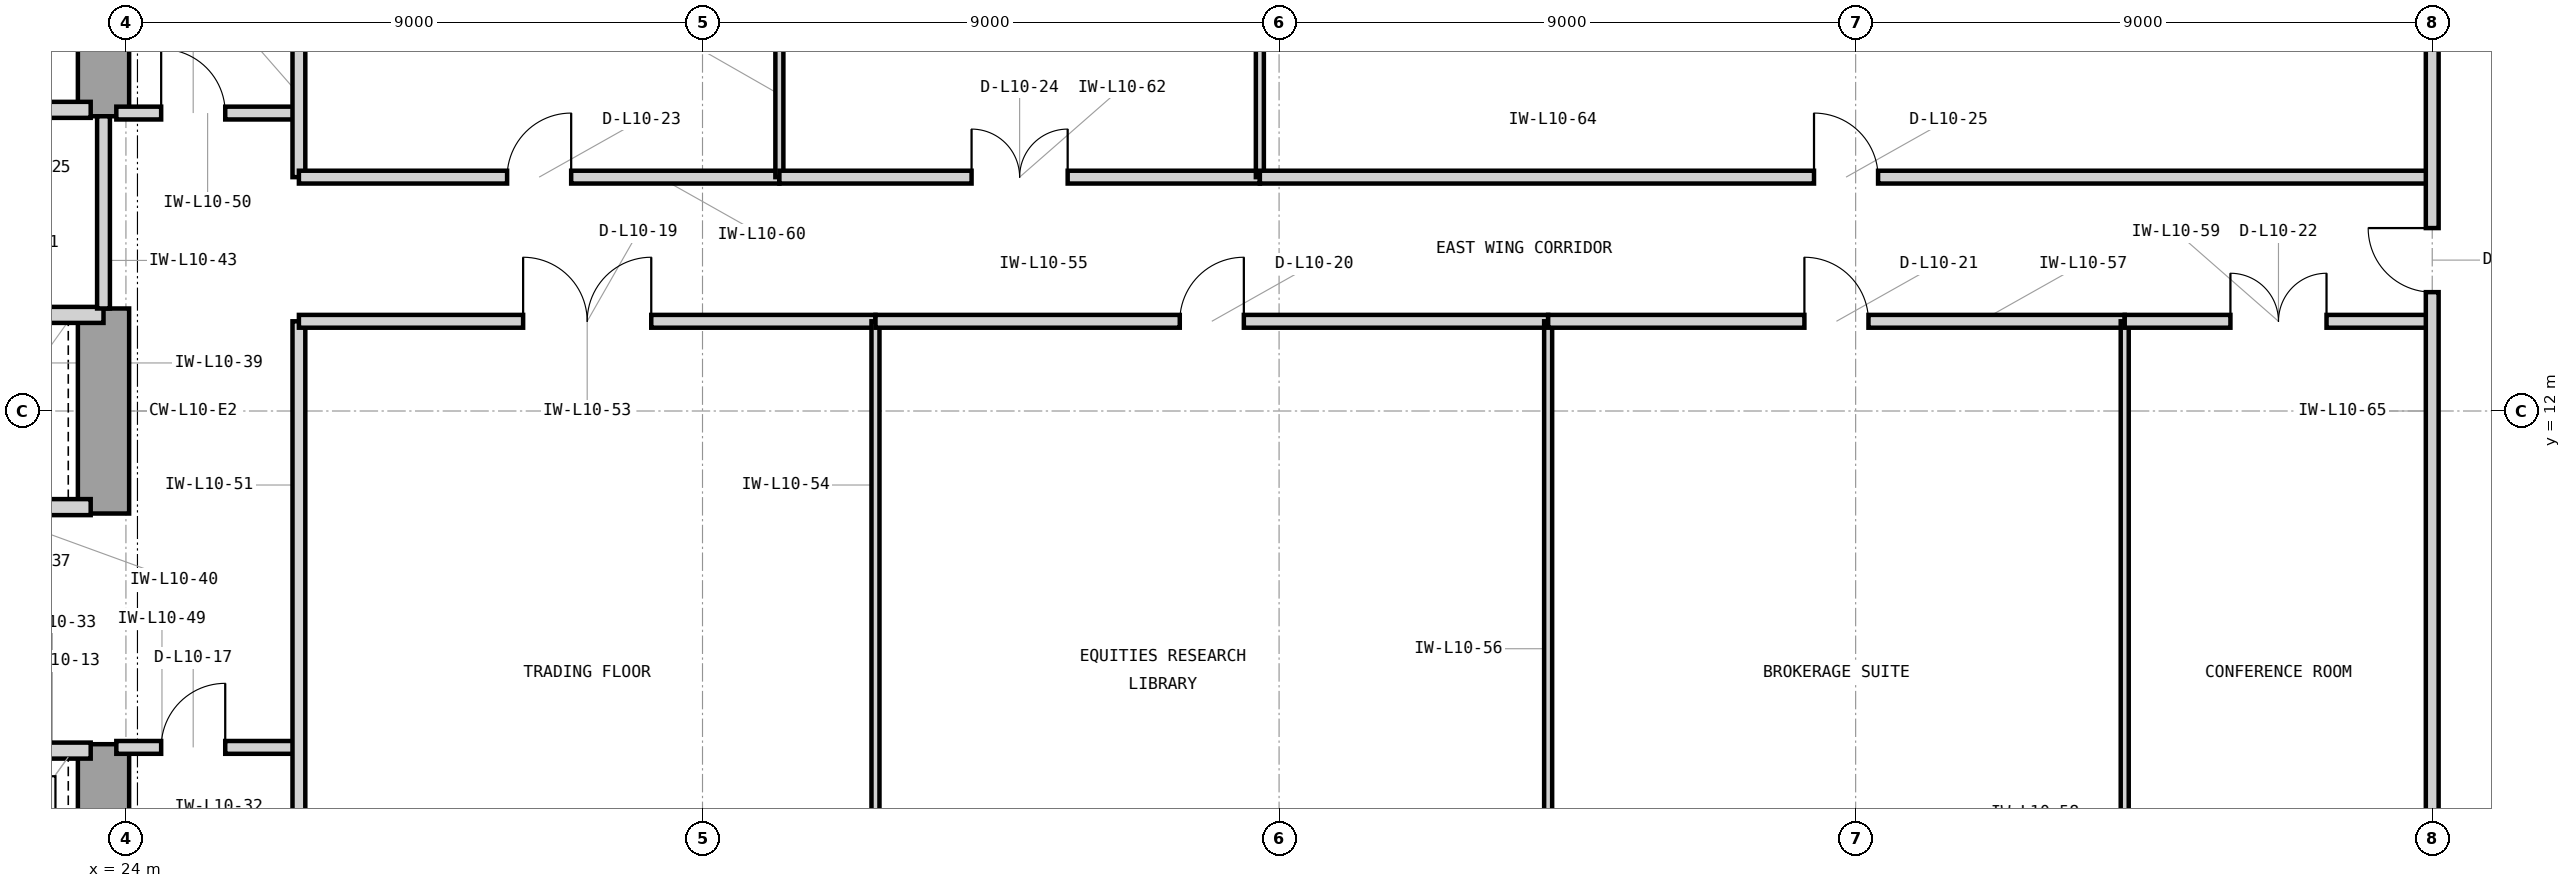
"""IFC4 building model, lengths in metres.
Left out: names, types, materials, properties, quantities, classifications, styles, units other than length and angle.
Written with IfcOpenShell. Run it as: python <this file> out.ifc"""

import sys

from ifc_helpers import new_model, si_unit, direction, frame, frame_2d, origin, place, context, subcontext, project, spatial, rectangle, extrude, element, fill, save


model = new_model("IFC4")
c1 = context("Model", 3, precision=1e-05, world=origin(), true_north=direction((0.0, 1.0)))
c2 = subcontext(c1, "Body", "Model", "MODEL_VIEW")
j1 = project(units=[si_unit("LENGTHUNIT", "METRE"), si_unit("PLANEANGLEUNIT", "RADIAN")], contexts=[c1])
p1 = place(None, origin())
s1 = spatial("IfcSite", under=j1, at=p1, CompositionType="ELEMENT")
p2 = place(p1, origin())
s2 = spatial("IfcBuilding", under=s1, at=p2, CompositionType="ELEMENT")
p3 = place(p2, frame((0.0, 0.0, 46.8)))
s3 = spatial("IfcBuildingStorey", under=s2, at=p3, CompositionType="ELEMENT", Elevation=46.8)
p4 = place(p3, frame((23.65, 3.75, 0.0), z_axis=(0.0, 0.0, 1.0), x_axis=(0.0, 1.0, 0.0)))
e1 = element("IfcWall", 1, at=p4, inside=s3, PredefinedType="SHEAR", context=c2, shape_type="SweptSolid", body=[
    extrude(rectangle(XDim=3.05, YDim=0.8, at=frame_2d((1.525, 0.0))), origin(), (0.0, 0.0, 1.0), 4.2),
])
p5 = place(p3, frame((23.65, 10.4, 0.0), z_axis=(0.0, 0.0, 1.0), x_axis=(0.0, 1.0, 0.0)))
e2 = element("IfcWall", 2, at=p5, inside=s3, PredefinedType="SHEAR", context=c2, shape_type="SweptSolid", body=[
    extrude(rectangle(XDim=3.2, YDim=0.8, at=frame_2d((1.6, 0.0))), origin(), (0.0, 0.0, 1.0), 4.2),
])
p6 = place(p3, frame((23.65, 16.6, 0.0), z_axis=(0.0, 0.0, 1.0), x_axis=(0.0, 1.0, 0.0)))
e3 = element("IfcWall", 3, at=p6, inside=s3, PredefinedType="SHEAR", context=c2, shape_type="SweptSolid", body=[
    extrude(rectangle(XDim=4.05, YDim=0.8, at=frame_2d((2.025, 0.0))), origin(), (0.0, 0.0, 1.0), 4.2),
])
p7 = place(p3, frame((21.05, 16.7, 0.0), z_axis=(0.0, 0.0, 1.0), x_axis=(1.0, 0.0, 0.0)))
e4 = element("IfcWall", 4, at=p7, inside=s3, PredefinedType="PARTITIONING", context=c2, shape_type="SweptSolid", body=[
    extrude(rectangle(XDim=2.4, YDim=0.25, at=frame_2d((1.2, 0.0))), origin(), (0.0, 0.0, 1.0), 3.426),
])
p8 = place(p3, frame((21.05, 6.7, 0.0), z_axis=(0.0, 0.0, 1.0), x_axis=(1.0, 0.0, 0.0)))
e5 = element("IfcWall", 5, at=p8, inside=s3, PredefinedType="PARTITIONING", context=c2, shape_type="SweptSolid", body=[
    extrude(rectangle(XDim=2.4, YDim=0.25, at=frame_2d((1.2, 0.0))), origin(), (0.0, 0.0, 1.0), 3.426),
])
p9 = place(p8, frame((0.48, 0.0, 0.0)))
e6 = element("IfcOpeningElement", 6, at=p9, cuts=e5, PredefinedType="OPENING", context=c2, shape_type="SweptSolid", body=[
    extrude(rectangle(XDim=1.15, YDim=2.25, at=frame_2d((0.575, 1.125))), frame((0.0, 0.135, 0.0), z_axis=(0.0, -1.0, 0.0), x_axis=(1.0, 0.0, 0.0)), (0.0, 0.0, 1.0), 0.27),
])
p10 = place(p3, frame((21.05, 10.5, 0.0), z_axis=(0.0, 0.0, 1.0), x_axis=(1.0, 0.0, 0.0)))
e7 = element("IfcWall", 7, at=p10, inside=s3, PredefinedType="PARTITIONING", context=c2, shape_type="SweptSolid", body=[
    extrude(rectangle(XDim=2.4, YDim=0.25, at=frame_2d((1.2, 0.0))), origin(), (0.0, 0.0, 1.0), 3.426),
])
p11 = place(p3, frame((14.7, 13.5, 0.0), z_axis=(0.0, 0.0, 1.0), x_axis=(1.0, 0.0, 0.0)))
e8 = element("IfcWall", 8, at=p11, inside=s3, PredefinedType="PARTITIONING", context=c2, shape_type="SweptSolid", body=[
    extrude(rectangle(XDim=8.95, YDim=0.25, at=frame_2d((4.475, 0.0))), origin(), (0.0, 0.0, 1.0), 3.426),
])
p12 = place(p3, frame((23.65, 13.6, 0.0), z_axis=(0.0, 0.0, 1.0), x_axis=(0.0, 1.0, 0.0)))
e9 = element("IfcWall", 9, at=p12, inside=s3, PredefinedType="PARTITIONING", context=c2, shape_type="SweptSolid", body=[
    extrude(rectangle(XDim=3.0, YDim=0.2, at=frame_2d((1.5, 0.0))), origin(), (0.0, 0.0, 1.0), 3.97),
])
p13 = place(p3, frame((23.85, 6.75, 0.0), z_axis=(0.0, 0.0, 1.0), x_axis=(1.0, 0.0, 0.0)))
e10 = element("IfcWall", 10, at=p13, inside=s3, PredefinedType="PARTITIONING", context=c2, shape_type="SweptSolid", body=[
    extrude(rectangle(XDim=2.85, YDim=0.2, at=frame_2d((1.425, 0.0))), origin(), (0.0, 0.0, 1.0), 3.97),
])
p14 = place(p13, frame((0.7, 0.0, 0.0)))
e11 = element("IfcOpeningElement", 11, at=p14, cuts=e10, PredefinedType="OPENING", context=c2, shape_type="SweptSolid", body=[
    extrude(rectangle(XDim=1.0, YDim=2.15, at=frame_2d((0.5, 1.075))), frame((0.0, 0.11, 0.0), z_axis=(0.0, -1.0, 0.0), x_axis=(1.0, 0.0, 0.0)), (0.0, 0.0, 1.0), 0.22),
])
p15 = place(p3, frame((23.85, 16.65, 0.0), z_axis=(0.0, 0.0, 1.0), x_axis=(1.0, 0.0, 0.0)))
e12 = element("IfcWall", 12, at=p15, inside=s3, PredefinedType="PARTITIONING", context=c2, shape_type="SweptSolid", body=[
    extrude(rectangle(XDim=2.85, YDim=0.2, at=frame_2d((1.425, 0.0))), origin(), (0.0, 0.0, 1.0), 3.97),
])
p16 = place(p15, frame((0.7, 0.0, 0.0)))
e13 = element("IfcOpeningElement", 13, at=p16, cuts=e12, PredefinedType="OPENING", context=c2, shape_type="SweptSolid", body=[
    extrude(rectangle(XDim=1.0, YDim=2.15, at=frame_2d((0.5, 1.075))), frame((0.0, 0.11, 0.0), z_axis=(0.0, -1.0, 0.0), x_axis=(1.0, 0.0, 0.0)), (0.0, 0.0, 1.0), 0.22),
])
p17 = place(p3, frame((26.7, 3.18, 0.0), z_axis=(0.0, 0.0, 1.0), x_axis=(0.0, 1.0, 0.0)))
e14 = element("IfcWall", 14, at=p17, inside=s3, PredefinedType="PARTITIONING", context=c2, shape_type="SweptSolid", body=[
    extrude(rectangle(XDim=10.22, YDim=0.2, at=frame_2d((5.11, 0.0))), origin(), (0.0, 0.0, 1.0), 3.97),
])
p18 = place(p3, frame((26.7, 15.65, 0.0), z_axis=(0.0, 0.0, 1.0), x_axis=(0.0, 1.0, 0.0)))
e15 = element("IfcWall", 15, at=p18, inside=s3, PredefinedType="PARTITIONING", context=c2, shape_type="SweptSolid", body=[
    extrude(rectangle(XDim=5.17, YDim=0.2, at=frame_2d((2.585, 0.0))), origin(), (0.0, 0.0, 1.0), 3.97),
])
p19 = place(p3, frame((26.7, 13.4, 0.0), z_axis=(0.0, 0.0, 1.0), x_axis=(1.0, 0.0, 0.0)))
e16 = element("IfcWall", 16, at=p19, inside=s3, PredefinedType="PARTITIONING", context=c2, shape_type="SweptSolid", body=[
    extrude(rectangle(XDim=9.0, YDim=0.2, at=frame_2d((4.5, 0.0))), origin(), (0.0, 0.0, 1.0), 3.97),
])
p20 = place(p19, frame((3.5, 0.0, 0.0)))
e17 = element("IfcOpeningElement", 17, at=p20, cuts=e16, PredefinedType="OPENING", context=c2, shape_type="SweptSolid", body=[
    extrude(rectangle(XDim=2.0, YDim=2.5, at=frame_2d((1.0, 1.25))), frame((0.0, 0.11, 0.0), z_axis=(0.0, -1.0, 0.0), x_axis=(1.0, 0.0, 0.0)), (0.0, 0.0, 1.0), 0.22),
])
p21 = place(p3, frame((35.7, 3.18, 0.0), z_axis=(0.0, 0.0, 1.0), x_axis=(0.0, 1.0, 0.0)))
e18 = element("IfcWall", 18, at=p21, inside=s3, PredefinedType="PARTITIONING", context=c2, shape_type="SweptSolid", body=[
    extrude(rectangle(XDim=10.22, YDim=0.125, at=frame_2d((5.11, 0.0))), origin(), (0.0, 0.0, 1.0), 3.97),
])
p22 = place(p3, frame((35.7, 13.4, 0.0), z_axis=(0.0, 0.0, 1.0), x_axis=(1.0, 0.0, 0.0)))
e19 = element("IfcWall", 19, at=p22, inside=s3, PredefinedType="PARTITIONING", context=c2, shape_type="SweptSolid", body=[
    extrude(rectangle(XDim=10.5, YDim=0.2, at=frame_2d((5.25, 0.0))), origin(), (0.0, 0.0, 1.0), 3.97),
])
p23 = place(p22, frame((4.75, 0.0, 0.0)))
e20 = element("IfcOpeningElement", 20, at=p23, cuts=e19, PredefinedType="OPENING", context=c2, shape_type="SweptSolid", body=[
    extrude(rectangle(XDim=1.0, YDim=2.15, at=frame_2d((0.5, 1.075))), frame((0.0, 0.11, 0.0), z_axis=(0.0, -1.0, 0.0), x_axis=(1.0, 0.0, 0.0)), (0.0, 0.0, 1.0), 0.22),
])
p24 = place(p3, frame((46.2, 3.18, 0.0), z_axis=(0.0, 0.0, 1.0), x_axis=(0.0, 1.0, 0.0)))
e21 = element("IfcWall", 21, at=p24, inside=s3, PredefinedType="PARTITIONING", context=c2, shape_type="SweptSolid", body=[
    extrude(rectangle(XDim=10.22, YDim=0.125, at=frame_2d((5.11, 0.0))), origin(), (0.0, 0.0, 1.0), 3.97),
])
p25 = place(p3, frame((46.2, 13.4, 0.0), z_axis=(0.0, 0.0, 1.0), x_axis=(1.0, 0.0, 0.0)))
e22 = element("IfcWall", 22, at=p25, inside=s3, PredefinedType="PARTITIONING", context=c2, shape_type="SweptSolid", body=[
    extrude(rectangle(XDim=9.0, YDim=0.2, at=frame_2d((4.5, 0.0))), origin(), (0.0, 0.0, 1.0), 3.97),
])
p26 = place(p25, frame((4.0, 0.0, 0.0)))
e23 = element("IfcOpeningElement", 23, at=p26, cuts=e22, PredefinedType="OPENING", context=c2, shape_type="SweptSolid", body=[
    extrude(rectangle(XDim=1.0, YDim=2.15, at=frame_2d((0.5, 1.075))), frame((0.0, 0.11, 0.0), z_axis=(0.0, -1.0, 0.0), x_axis=(1.0, 0.0, 0.0)), (0.0, 0.0, 1.0), 0.22),
])
p27 = place(p3, frame((55.2, 3.18, 0.0), z_axis=(0.0, 0.0, 1.0), x_axis=(0.0, 1.0, 0.0)))
e24 = element("IfcWall", 24, at=p27, inside=s3, PredefinedType="PARTITIONING", context=c2, shape_type="SweptSolid", body=[
    extrude(rectangle(XDim=10.22, YDim=0.125, at=frame_2d((5.11, 0.0))), origin(), (0.0, 0.0, 1.0), 3.97),
])
p28 = place(p3, frame((55.2, 13.4, 0.0), z_axis=(0.0, 0.0, 1.0), x_axis=(1.0, 0.0, 0.0)))
e25 = element("IfcWall", 25, at=p28, inside=s3, PredefinedType="PARTITIONING", context=c2, shape_type="SweptSolid", body=[
    extrude(rectangle(XDim=4.8, YDim=0.2, at=frame_2d((2.4, 0.0))), origin(), (0.0, 0.0, 1.0), 3.97),
])
p29 = place(p28, frame((1.65, 0.0, 0.0)))
e26 = element("IfcOpeningElement", 26, at=p29, cuts=e25, PredefinedType="OPENING", context=c2, shape_type="SweptSolid", body=[
    extrude(rectangle(XDim=1.5, YDim=2.3, at=frame_2d((0.75, 1.15))), frame((0.0, 0.11, 0.0), z_axis=(0.0, -1.0, 0.0), x_axis=(1.0, 0.0, 0.0)), (0.0, 0.0, 1.0), 0.22),
])
p30 = place(p3, frame((26.7, 15.65, 0.0), z_axis=(0.0, 0.0, 1.0), x_axis=(1.0, 0.0, 0.0)))
e27 = element("IfcWall", 27, at=p30, inside=s3, PredefinedType="PARTITIONING", context=c2, shape_type="SweptSolid", body=[
    extrude(rectangle(XDim=7.5, YDim=0.2, at=frame_2d((3.75, 0.0))), origin(), (0.0, 0.0, 1.0), 3.97),
])
p31 = place(p30, frame((3.25, 0.0, 0.0)))
e28 = element("IfcOpeningElement", 28, at=p31, cuts=e27, PredefinedType="OPENING", context=c2, shape_type="SweptSolid", body=[
    extrude(rectangle(XDim=1.0, YDim=2.15, at=frame_2d((0.5, 1.075))), frame((0.0, 0.11, 0.0), z_axis=(0.0, -1.0, 0.0), x_axis=(1.0, 0.0, 0.0)), (0.0, 0.0, 1.0), 0.22),
])
p32 = place(p3, frame((34.2, 15.65, 0.0), z_axis=(0.0, 0.0, 1.0), x_axis=(0.0, 1.0, 0.0)))
e29 = element("IfcWall", 29, at=p32, inside=s3, PredefinedType="PARTITIONING", context=c2, shape_type="SweptSolid", body=[
    extrude(rectangle(XDim=5.17, YDim=0.125, at=frame_2d((2.585, 0.0))), origin(), (0.0, 0.0, 1.0), 3.97),
])
p33 = place(p3, frame((34.2, 15.65, 0.0), z_axis=(0.0, 0.0, 1.0), x_axis=(1.0, 0.0, 0.0)))
e30 = element("IfcWall", 30, at=p33, inside=s3, PredefinedType="PARTITIONING", context=c2, shape_type="SweptSolid", body=[
    extrude(rectangle(XDim=7.5, YDim=0.2, at=frame_2d((3.75, 0.0))), origin(), (0.0, 0.0, 1.0), 3.97),
])
p34 = place(p33, frame((3.0, 0.0, 0.0)))
e31 = element("IfcOpeningElement", 31, at=p34, cuts=e30, PredefinedType="OPENING", context=c2, shape_type="SweptSolid", body=[
    extrude(rectangle(XDim=1.5, YDim=2.3, at=frame_2d((0.75, 1.15))), frame((0.0, 0.11, 0.0), z_axis=(0.0, -1.0, 0.0), x_axis=(1.0, 0.0, 0.0)), (0.0, 0.0, 1.0), 0.22),
])
p35 = place(p3, frame((41.7, 15.65, 0.0), z_axis=(0.0, 0.0, 1.0), x_axis=(0.0, 1.0, 0.0)))
e32 = element("IfcWall", 32, at=p35, inside=s3, PredefinedType="PARTITIONING", context=c2, shape_type="SweptSolid", body=[
    extrude(rectangle(XDim=5.17, YDim=0.125, at=frame_2d((2.585, 0.0))), origin(), (0.0, 0.0, 1.0), 3.97),
])
p36 = place(p3, frame((41.7, 15.65, 0.0), z_axis=(0.0, 0.0, 1.0), x_axis=(1.0, 0.0, 0.0)))
e33 = element("IfcWall", 33, at=p36, inside=s3, PredefinedType="PARTITIONING", context=c2, shape_type="SweptSolid", body=[
    extrude(rectangle(XDim=18.3, YDim=0.2, at=frame_2d((9.15, 0.0))), origin(), (0.0, 0.0, 1.0), 3.97),
])
p37 = place(p36, frame((8.65, 0.0, 0.0)))
e34 = element("IfcOpeningElement", 34, at=p37, cuts=e33, PredefinedType="OPENING", context=c2, shape_type="SweptSolid", body=[
    extrude(rectangle(XDim=1.0, YDim=2.15, at=frame_2d((0.5, 1.075))), frame((0.0, 0.11, 0.0), z_axis=(0.0, -1.0, 0.0), x_axis=(1.0, 0.0, 0.0)), (0.0, 0.0, 1.0), 0.22),
])
p38 = place(p3, frame((60.0, 3.18, 0.0), z_axis=(0.0, 0.0, 1.0), x_axis=(0.0, 1.0, 0.0)))
e35 = element("IfcWall", 35, at=p38, inside=s3, PredefinedType="PARTITIONING", context=c2, shape_type="SweptSolid", body=[
    extrude(rectangle(XDim=17.64, YDim=0.2, at=frame_2d((8.82, 0.0))), origin(), (0.0, 0.0, 1.0), 3.97),
])
p39 = place(p38, frame((10.675, 0.0, 0.0)))
e36 = element("IfcOpeningElement", 36, at=p39, cuts=e35, PredefinedType="OPENING", context=c2, shape_type="SweptSolid", body=[
    extrude(rectangle(XDim=1.0, YDim=2.15, at=frame_2d((0.5, 1.075))), frame((0.0, 0.11, 0.0), z_axis=(0.0, -1.0, 0.0), x_axis=(1.0, 0.0, 0.0)), (0.0, 0.0, 1.0), 0.22),
])
p40 = place(p14, origin())
e37 = element("IfcDoor", 37, at=p40, inside=s3, OperationType="SINGLE_SWING_RIGHT", PredefinedType="DOOR", context=c2, shape_type="SweptSolid", body=[
    extrude(rectangle(XDim=1.0, YDim=2.15, at=frame_2d((0.5, 1.075))), frame((0.0, 0.025, 0.0), z_axis=(0.0, -1.0, 0.0), x_axis=(1.0, 0.0, 0.0)), (0.0, 0.0, 1.0), 0.05),
])
fill(e11, e37)
p41 = place(p16, origin())
e38 = element("IfcDoor", 38, at=p41, inside=s3, OperationType="SINGLE_SWING_LEFT", PredefinedType="DOOR", context=c2, shape_type="SweptSolid", body=[
    extrude(rectangle(XDim=1.0, YDim=2.15, at=frame_2d((0.5, 1.075))), frame((0.0, 0.025, 0.0), z_axis=(0.0, -1.0, 0.0), x_axis=(1.0, 0.0, 0.0)), (0.0, 0.0, 1.0), 0.05),
])
fill(e13, e38)
p42 = place(p20, origin())
e39 = element("IfcDoor", 39, at=p42, inside=s3, OperationType="DOUBLE_DOOR_SINGLE_SWING", PredefinedType="DOOR", context=c2, shape_type="SweptSolid", body=[
    extrude(rectangle(XDim=2.0, YDim=2.5, at=frame_2d((1.0, 1.25))), frame((0.0, 0.025, 0.0), z_axis=(0.0, -1.0, 0.0), x_axis=(1.0, 0.0, 0.0)), (0.0, 0.0, 1.0), 0.05),
])
fill(e17, e39)
p43 = place(p23, origin())
e40 = element("IfcDoor", 40, at=p43, inside=s3, OperationType="SINGLE_SWING_RIGHT", PredefinedType="DOOR", context=c2, shape_type="SweptSolid", body=[
    extrude(rectangle(XDim=1.0, YDim=2.15, at=frame_2d((0.5, 1.075))), frame((0.0, 0.025, 0.0), z_axis=(0.0, -1.0, 0.0), x_axis=(1.0, 0.0, 0.0)), (0.0, 0.0, 1.0), 0.05),
])
fill(e20, e40)
p44 = place(p26, origin())
e41 = element("IfcDoor", 41, at=p44, inside=s3, OperationType="SINGLE_SWING_LEFT", PredefinedType="DOOR", context=c2, shape_type="SweptSolid", body=[
    extrude(rectangle(XDim=1.0, YDim=2.15, at=frame_2d((0.5, 1.075))), frame((0.0, 0.025, 0.0), z_axis=(0.0, -1.0, 0.0), x_axis=(1.0, 0.0, 0.0)), (0.0, 0.0, 1.0), 0.05),
])
fill(e23, e41)
p45 = place(p29, origin())
e42 = element("IfcDoor", 42, at=p45, inside=s3, OperationType="DOUBLE_DOOR_SINGLE_SWING", PredefinedType="DOOR", context=c2, shape_type="SweptSolid", body=[
    extrude(rectangle(XDim=1.5, YDim=2.3, at=frame_2d((0.75, 1.15))), frame((0.0, 0.025, 0.0), z_axis=(0.0, -1.0, 0.0), x_axis=(1.0, 0.0, 0.0)), (0.0, 0.0, 1.0), 0.05),
])
fill(e26, e42)
p46 = place(p31, origin())
e43 = element("IfcDoor", 43, at=p46, inside=s3, OperationType="SINGLE_SWING_RIGHT", PredefinedType="DOOR", context=c2, shape_type="SweptSolid", body=[
    extrude(rectangle(XDim=1.0, YDim=2.15, at=frame_2d((0.5, 1.075))), frame((0.0, 0.025, 0.0), z_axis=(0.0, -1.0, 0.0), x_axis=(1.0, 0.0, 0.0)), (0.0, 0.0, 1.0), 0.05),
])
fill(e28, e43)
p47 = place(p34, origin())
e44 = element("IfcDoor", 44, at=p47, inside=s3, OperationType="DOUBLE_DOOR_SINGLE_SWING", PredefinedType="DOOR", context=c2, shape_type="SweptSolid", body=[
    extrude(rectangle(XDim=1.5, YDim=2.3, at=frame_2d((0.75, 1.15))), frame((0.0, 0.025, 0.0), z_axis=(0.0, -1.0, 0.0), x_axis=(1.0, 0.0, 0.0)), (0.0, 0.0, 1.0), 0.05),
])
fill(e31, e44)
p48 = place(p37, origin())
e45 = element("IfcDoor", 45, at=p48, inside=s3, OperationType="SINGLE_SWING_LEFT", PredefinedType="DOOR", context=c2, shape_type="SweptSolid", body=[
    extrude(rectangle(XDim=1.0, YDim=2.15, at=frame_2d((0.5, 1.075))), frame((0.0, 0.025, 0.0), z_axis=(0.0, -1.0, 0.0), x_axis=(1.0, 0.0, 0.0)), (0.0, 0.0, 1.0), 0.05),
])
fill(e34, e45)
p49 = place(p39, origin())
e46 = element("IfcDoor", 46, at=p49, inside=s3, OperationType="SINGLE_SWING_RIGHT", PredefinedType="DOOR", context=c2, shape_type="SweptSolid", body=[
    extrude(rectangle(XDim=1.0, YDim=2.15, at=frame_2d((0.5, 1.075))), frame((0.0, 0.025, 0.0), z_axis=(0.0, -1.0, 0.0), x_axis=(1.0, 0.0, 0.0)), (0.0, 0.0, 1.0), 0.05),
])
fill(e36, e46)
save(model, sys.argv[1])
